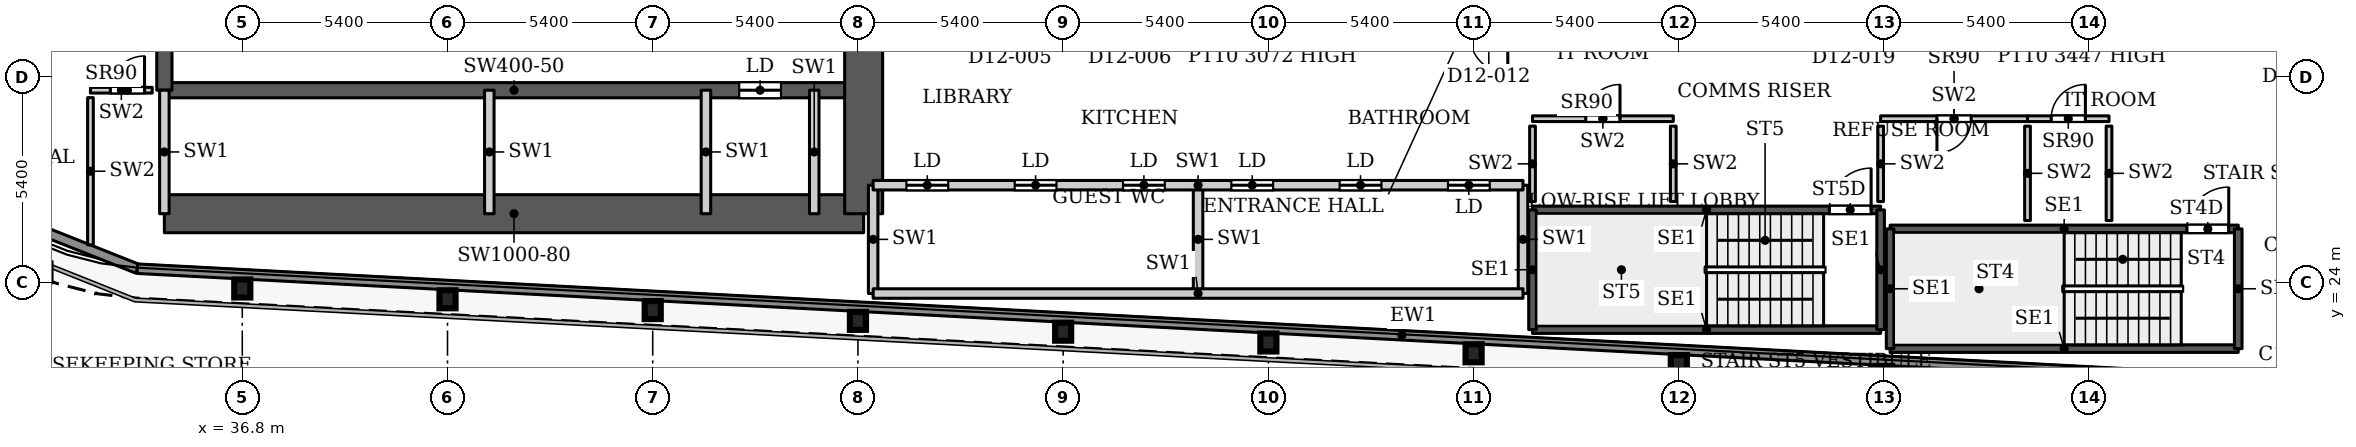
"""IFC4 building model, lengths in metres.
Left out: names, types, materials, properties, quantities, classifications, styles, units other than length and angle.
Written with IfcOpenShell. Run it as: python <this file> out.ifc"""

import sys

from ifc_helpers import new_model, si_unit, direction, frame, frame_2d, origin, origin_2d, place, context, subcontext, project, spatial, rectangle, i_section, extrude, source, transform, mapped, element, fill, save


model = new_model("IFC4")
c1 = context("Model", 3, precision=1e-05, world=origin(), true_north=direction((0.0, 1.0)))
c2 = subcontext(c1, "Body", "Model", "MODEL_VIEW")
j1 = project(units=[si_unit("LENGTHUNIT", "METRE"), si_unit("PLANEANGLEUNIT", "RADIAN")], contexts=[c1])
p1 = place(None, origin())
s1 = spatial("IfcSite", under=j1, at=p1, CompositionType="ELEMENT")
p2 = place(p1, origin())
s2 = spatial("IfcBuilding", under=s1, at=p2, CompositionType="ELEMENT")
p3 = place(p2, frame((0.0, 0.0, 53.9)))
s3 = spatial("IfcBuildingStorey", under=s2, at=p3, CompositionType="ELEMENT", Elevation=53.9)
for number, where, z_axis, x_axis in (
    (1, (80.0, 21.558, 0.0), (0.0, 0.0, 1.0), (1.0, 0.0, 0.0)),
    (2, (74.6, 21.843, 0.0), (0.0, 0.0, 1.0), (1.0, 0.0, 0.0)),
    (3, (69.2, 22.127, 0.0), (0.0, 0.0, 1.0), (1.0, 0.0, 0.0)),
    (4, (63.8, 22.411, 0.0), (0.0, 0.0, 1.0), (1.0, 0.0, 0.0)),
    (5, (58.4, 22.695, 0.0), (0.0, 0.0, 1.0), (1.0, 0.0, 0.0)),
    (6, (53.0, 22.98, 0.0), (0.0, 0.0, 1.0), (1.0, 0.0, 0.0)),
    (7, (47.6, 23.264, 0.0), (0.0, 0.0, 1.0), (1.0, 0.0, 0.0)),
    (8, (42.2, 23.548, 0.0), (0.0, 0.0, 1.0), (1.0, 0.0, 0.0)),
    (9, (36.8, 23.832, 0.0), (0.0, 0.0, 1.0), (1.0, 0.0, 0.0)),
):
    element("IfcColumn", number, at=place(p3, frame(where, z_axis=z_axis, x_axis=x_axis)), inside=s3, PredefinedType="COLUMN", context=c2, shape_type="SweptSolid", body=[
        extrude(i_section(OverallWidth=0.424, OverallDepth=0.474, WebThickness=0.048, FlangeThickness=0.077, FilletRadius=0.014, at=origin_2d()), origin(), (0.0, 0.0, 1.0), 3.9),
    ])
p4 = place(p3, frame((34.75, 25.8, 0.0), z_axis=(0.0, 0.0, 1.0), x_axis=(1.0, 0.0, 0.0)))
e10 = element("IfcWall", 10, at=p4, inside=s3, PredefinedType="SHEAR", context=c2, shape_type="SweptSolid", body=[
    extrude(rectangle(XDim=18.4, YDim=1.0, at=frame_2d((9.2, 0.0))), origin(), (0.0, 0.0, 1.0), 3.9),
])
p5 = place(p3, frame((34.75, 29.05, 0.0), z_axis=(0.0, 0.0, 1.0), x_axis=(1.0, 0.0, 0.0)))
e11 = element("IfcWall", 11, at=p5, inside=s3, PredefinedType="SHEAR", context=c2, shape_type="SweptSolid", body=[
    extrude(rectangle(XDim=18.4, YDim=0.4, at=frame_2d((9.2, 0.0))), origin(), (0.0, 0.0, 1.0), 3.9),
])
p6 = place(p5, frame((15.125, 0.0, 0.0)))
e12 = element("IfcOpeningElement", 12, at=p6, cuts=e11, PredefinedType="OPENING", context=c2, shape_type="SweptSolid", body=[
    extrude(rectangle(XDim=1.1, YDim=2.2, at=frame_2d((0.55, 1.1))), frame((0.0, 0.21, 0.0), z_axis=(0.0, -1.0, 0.0), x_axis=(1.0, 0.0, 0.0)), (0.0, 0.0, 1.0), 0.42),
])
p7 = place(p3, frame((34.75, 29.05, 0.0), z_axis=(0.0, 0.0, 1.0), x_axis=(0.0, 1.0, 0.0)))
e13 = element("IfcWall", 13, at=p7, inside=s3, PredefinedType="SHEAR", context=c2, shape_type="SweptSolid", body=[
    extrude(rectangle(XDim=18.45, YDim=0.4, at=frame_2d((9.225, 0.0))), origin(), (0.0, 0.0, 1.0), 3.9),
])
p8 = place(p7, frame((8.025, 0.0, 0.0)))
e14 = element("IfcOpeningElement", 14, at=p8, cuts=e13, PredefinedType="OPENING", context=c2, shape_type="SweptSolid", body=[
    extrude(rectangle(XDim=1.1, YDim=2.2, at=frame_2d((0.55, 1.1))), frame((0.0, 0.21, 0.0), z_axis=(0.0, -1.0, 0.0), x_axis=(1.0, 0.0, 0.0)), (0.0, 0.0, 1.0), 0.42),
])
p9 = place(p7, frame((10.875, 0.0, 0.0)))
e15 = element("IfcOpeningElement", 15, at=p9, cuts=e13, PredefinedType="OPENING", context=c2, shape_type="SweptSolid", body=[
    extrude(rectangle(XDim=1.1, YDim=2.2, at=frame_2d((0.55, 1.1))), frame((0.0, 0.21, 0.0), z_axis=(0.0, -1.0, 0.0), x_axis=(1.0, 0.0, 0.0)), (0.0, 0.0, 1.0), 0.42),
])
p10 = place(p7, frame((13.725, 0.0, 0.0)))
e16 = element("IfcOpeningElement", 16, at=p10, cuts=e13, PredefinedType="OPENING", context=c2, shape_type="SweptSolid", body=[
    extrude(rectangle(XDim=1.1, YDim=2.2, at=frame_2d((0.55, 1.1))), frame((0.0, 0.21, 0.0), z_axis=(0.0, -1.0, 0.0), x_axis=(1.0, 0.0, 0.0)), (0.0, 0.0, 1.0), 0.42),
])
p11 = place(p7, frame((15.95, 0.0, 0.0)))
e17 = element("IfcOpeningElement", 17, at=p11, cuts=e13, PredefinedType="OPENING", context=c2, shape_type="SweptSolid", body=[
    extrude(rectangle(XDim=1.1, YDim=2.2, at=frame_2d((0.55, 1.1))), frame((0.0, 0.21, 0.0), z_axis=(0.0, -1.0, 0.0), x_axis=(1.0, 0.0, 0.0)), (0.0, 0.0, 1.0), 0.42),
])
p12 = place(p3, frame((53.15, 25.8, 0.0), z_axis=(0.0, 0.0, 1.0), x_axis=(0.0, 1.0, 0.0)))
e18 = element("IfcWall", 18, at=p12, inside=s3, PredefinedType="SHEAR", context=c2, shape_type="SweptSolid", body=[
    extrude(rectangle(XDim=10.4, YDim=1.0, at=frame_2d((5.2, 0.0))), origin(), (0.0, 0.0, 1.0), 3.9),
])
p13 = place(p3, frame((34.039, 24.353, 0.0), z_axis=(0.0, 0.0, 1.0), x_axis=(-0.929352825399, 0.369192803184, 0.0)))
e19 = element("IfcWall", 19, at=p13, inside=s3, PredefinedType="SOLIDWALL", context=c2, shape_type="SweptSolid", body=[
    extrude(rectangle(XDim=4.656, YDim=0.25, at=frame_2d((2.328, 0.0))), origin(), (0.0, 0.0, 1.0), 3.75),
])
p14 = place(p3, frame((100.586, 20.85, 0.0), z_axis=(0.0, 0.0, 1.0), x_axis=(-0.99861746497, 0.052565755559, 0.0)))
e20 = element("IfcWall", 20, at=p14, inside=s3, PredefinedType="SOLIDWALL", context=c2, shape_type="SweptSolid", body=[
    extrude(rectangle(XDim=66.639, YDim=0.25, at=frame_2d((33.319, 0.0))), origin(), (0.0, 0.0, 1.0), 3.75),
])
p15 = place(p3, frame((80.16, 22.25, 0.0), z_axis=(0.0, 0.0, 1.0), x_axis=(1.0, 0.0, 0.0)))
e21 = element("IfcWall", 21, at=p15, inside=s3, PredefinedType="SHEAR", context=c2, shape_type="SweptSolid", body=[
    extrude(rectangle(XDim=9.16, YDim=0.2, at=frame_2d((4.58, 0.0))), origin(), (0.0, 0.0, 1.0), 3.9),
])
p16 = place(p3, frame((80.16, 25.4, 0.0), z_axis=(0.0, 0.0, 1.0), x_axis=(1.0, 0.0, 0.0)))
e22 = element("IfcWall", 22, at=p16, inside=s3, PredefinedType="SHEAR", context=c2, shape_type="SweptSolid", body=[
    extrude(rectangle(XDim=9.16, YDim=0.2, at=frame_2d((4.58, 0.0))), origin(), (0.0, 0.0, 1.0), 3.9),
])
p17 = place(p16, frame((7.81, 0.0, 0.0)))
e23 = element("IfcOpeningElement", 23, at=p17, cuts=e22, PredefinedType="OPENING", context=c2, shape_type="SweptSolid", body=[
    extrude(rectangle(XDim=1.1, YDim=2.2, at=frame_2d((0.55, 1.1))), frame((0.0, 0.11, 0.0), z_axis=(0.0, -1.0, 0.0), x_axis=(1.0, 0.0, 0.0)), (0.0, 0.0, 1.0), 0.22),
])
for number, where, z_axis, x_axis in (
    (24, (80.16, 22.25, 0.0), (0.0, 0.0, 1.0), (0.0, 1.0, 0.0)),
    (25, (89.32, 22.25, 0.0), (0.0, 0.0, 1.0), (0.0, 1.0, 0.0)),
):
    element("IfcWall", number, at=place(p3, frame(where, z_axis=z_axis, x_axis=x_axis)), inside=s3, PredefinedType="SHEAR", context=c2, shape_type="SweptSolid", body=[
        extrude(rectangle(XDim=3.15, YDim=0.2, at=frame_2d((1.575, 0.0))), origin(), (0.0, 0.0, 1.0), 3.9),
    ])
p18 = place(p3, frame((70.75, 22.75, 0.0), z_axis=(0.0, 0.0, 1.0), x_axis=(1.0, 0.0, 0.0)))
e26 = element("IfcWall", 26, at=p18, inside=s3, PredefinedType="SHEAR", context=c2, shape_type="SweptSolid", body=[
    extrude(rectangle(XDim=9.16, YDim=0.2, at=frame_2d((4.58, 0.0))), origin(), (0.0, 0.0, 1.0), 3.9),
])
p19 = place(p3, frame((70.75, 25.9, 0.0), z_axis=(0.0, 0.0, 1.0), x_axis=(1.0, 0.0, 0.0)))
e27 = element("IfcWall", 27, at=p19, inside=s3, PredefinedType="SHEAR", context=c2, shape_type="SweptSolid", body=[
    extrude(rectangle(XDim=9.16, YDim=0.2, at=frame_2d((4.58, 0.0))), origin(), (0.0, 0.0, 1.0), 3.9),
])
p20 = place(p19, frame((7.81, 0.0, 0.0)))
e28 = element("IfcOpeningElement", 28, at=p20, cuts=e27, PredefinedType="OPENING", context=c2, shape_type="SweptSolid", body=[
    extrude(rectangle(XDim=1.1, YDim=2.2, at=frame_2d((0.55, 1.1))), frame((0.0, 0.11, 0.0), z_axis=(0.0, -1.0, 0.0), x_axis=(1.0, 0.0, 0.0)), (0.0, 0.0, 1.0), 0.22),
])
for number, where, z_axis, x_axis in (
    (29, (70.75, 22.75, 0.0), (0.0, 0.0, 1.0), (0.0, 1.0, 0.0)),
    (30, (79.91, 22.75, 0.0), (0.0, 0.0, 1.0), (0.0, 1.0, 0.0)),
):
    element("IfcWall", number, at=place(p3, frame(where, z_axis=z_axis, x_axis=x_axis)), inside=s3, PredefinedType="SHEAR", context=c2, shape_type="SweptSolid", body=[
        extrude(rectangle(XDim=3.15, YDim=0.2, at=frame_2d((1.575, 0.0))), origin(), (0.0, 0.0, 1.0), 3.9),
    ])
for number, where, z_axis, x_axis in (
    (31, (34.75, 25.8, 0.0), (0.0, 0.0, 1.0), (0.0, 1.0, 0.0)),
    (32, (43.3, 25.8, 0.0), (0.0, 0.0, 1.0), (0.0, 1.0, 0.0)),
    (33, (49.0, 25.8, 0.0), (0.0, 0.0, 1.0), (0.0, 1.0, 0.0)),
    (34, (51.85, 25.8, 0.0), (0.0, 0.0, 1.0), (0.0, 1.0, 0.0)),
):
    element("IfcWall", number, at=place(p3, frame(where, z_axis=z_axis, x_axis=x_axis)), inside=s3, PredefinedType="PARTITIONING", context=c2, shape_type="SweptSolid", body=[
        extrude(rectangle(XDim=3.25, YDim=0.25, at=frame_2d((1.625, 0.0))), origin(), (0.0, 0.0, 1.0), 3.9),
    ])
for number, where, z_axis, x_axis in (
    (35, (53.4, 23.7, 0.0), (0.0, 0.0, 1.0), (0.0, 1.0, 0.0)),
    (36, (61.95, 23.7, 0.0), (0.0, 0.0, 1.0), (0.0, 1.0, 0.0)),
    (37, (70.5, 23.7, 0.0), (0.0, 0.0, 1.0), (0.0, 1.0, 0.0)),
):
    element("IfcWall", number, at=place(p3, frame(where, z_axis=z_axis, x_axis=x_axis)), inside=s3, PredefinedType="PARTITIONING", context=c2, shape_type="SweptSolid", body=[
        extrude(rectangle(XDim=2.85, YDim=0.25, at=frame_2d((1.425, 0.0))), origin(), (0.0, 0.0, 1.0), 3.9),
    ])
p21 = place(p3, frame((53.4, 23.7, 0.0), z_axis=(0.0, 0.0, 1.0), x_axis=(1.0, 0.0, 0.0)))
e38 = element("IfcWall", 38, at=p21, inside=s3, PredefinedType="PARTITIONING", context=c2, shape_type="SweptSolid", body=[
    extrude(rectangle(XDim=17.1, YDim=0.25, at=frame_2d((8.55, 0.0))), origin(), (0.0, 0.0, 1.0), 3.9),
])
p22 = place(p3, frame((53.4, 26.55, 0.0), z_axis=(0.0, 0.0, 1.0), x_axis=(1.0, 0.0, 0.0)))
e39 = element("IfcWall", 39, at=p22, inside=s3, PredefinedType="PARTITIONING", context=c2, shape_type="SweptSolid", body=[
    extrude(rectangle(XDim=17.1, YDim=0.25, at=frame_2d((8.55, 0.0))), origin(), (0.0, 0.0, 1.0), 3.9),
])
p23 = place(p22, frame((0.875, 0.0, 0.0)))
e40 = element("IfcOpeningElement", 40, at=p23, cuts=e39, PredefinedType="OPENING", context=c2, shape_type="SweptSolid", body=[
    extrude(rectangle(XDim=1.1, YDim=2.2, at=frame_2d((0.55, 1.1))), frame((0.0, 0.135, 0.0), z_axis=(0.0, -1.0, 0.0), x_axis=(1.0, 0.0, 0.0)), (0.0, 0.0, 1.0), 0.27),
])
p24 = place(p22, frame((3.725, 0.0, 0.0)))
e41 = element("IfcOpeningElement", 41, at=p24, cuts=e39, PredefinedType="OPENING", context=c2, shape_type="SweptSolid", body=[
    extrude(rectangle(XDim=1.1, YDim=2.2, at=frame_2d((0.55, 1.1))), frame((0.0, 0.135, 0.0), z_axis=(0.0, -1.0, 0.0), x_axis=(1.0, 0.0, 0.0)), (0.0, 0.0, 1.0), 0.27),
])
p25 = place(p22, frame((6.575, 0.0, 0.0)))
e42 = element("IfcOpeningElement", 42, at=p25, cuts=e39, PredefinedType="OPENING", context=c2, shape_type="SweptSolid", body=[
    extrude(rectangle(XDim=1.1, YDim=2.2, at=frame_2d((0.55, 1.1))), frame((0.0, 0.135, 0.0), z_axis=(0.0, -1.0, 0.0), x_axis=(1.0, 0.0, 0.0)), (0.0, 0.0, 1.0), 0.27),
])
p26 = place(p22, frame((9.425, 0.0, 0.0)))
e43 = element("IfcOpeningElement", 43, at=p26, cuts=e39, PredefinedType="OPENING", context=c2, shape_type="SweptSolid", body=[
    extrude(rectangle(XDim=1.1, YDim=2.2, at=frame_2d((0.55, 1.1))), frame((0.0, 0.135, 0.0), z_axis=(0.0, -1.0, 0.0), x_axis=(1.0, 0.0, 0.0)), (0.0, 0.0, 1.0), 0.27),
])
p27 = place(p22, frame((12.275, 0.0, 0.0)))
e44 = element("IfcOpeningElement", 44, at=p27, cuts=e39, PredefinedType="OPENING", context=c2, shape_type="SweptSolid", body=[
    extrude(rectangle(XDim=1.1, YDim=2.2, at=frame_2d((0.55, 1.1))), frame((0.0, 0.135, 0.0), z_axis=(0.0, -1.0, 0.0), x_axis=(1.0, 0.0, 0.0)), (0.0, 0.0, 1.0), 0.27),
])
p28 = place(p22, frame((15.125, 0.0, 0.0)))
e45 = element("IfcOpeningElement", 45, at=p28, cuts=e39, PredefinedType="OPENING", context=c2, shape_type="SweptSolid", body=[
    extrude(rectangle(XDim=1.1, YDim=2.2, at=frame_2d((0.55, 1.1))), frame((0.0, 0.135, 0.0), z_axis=(0.0, -1.0, 0.0), x_axis=(1.0, 0.0, 0.0)), (0.0, 0.0, 1.0), 0.27),
])
p29 = place(p3, frame((32.805, 29.05, 0.0), z_axis=(0.0, 0.0, 1.0), x_axis=(1.0, 0.0, 0.0)))
e46 = element("IfcWall", 46, at=p29, inside=s3, PredefinedType="PARTITIONING", context=c2, shape_type="SweptSolid", body=[
    extrude(rectangle(XDim=1.625, YDim=0.15, at=frame_2d((0.812, 0.0))), origin(), (0.0, 0.0, 1.0), 3.9),
])
p30 = place(p29, frame((0.523, 0.0, 0.0)))
e47 = element("IfcOpeningElement", 47, at=p30, cuts=e46, PredefinedType="OPENING", context=c2, shape_type="SweptSolid", body=[
    extrude(rectangle(XDim=0.9, YDim=2.2, at=frame_2d((0.45, 1.1))), frame((0.0, 0.085, 0.0), z_axis=(0.0, -1.0, 0.0), x_axis=(1.0, 0.0, 0.0)), (0.0, 0.0, 1.0), 0.17),
])
p31 = place(p3, frame((32.805, 24.98, 0.0), z_axis=(0.0, 0.0, 1.0), x_axis=(0.0, 1.0, 0.0)))
e48 = element("IfcWall", 48, at=p31, inside=s3, PredefinedType="PARTITIONING", context=c2, shape_type="SweptSolid", body=[
    extrude(rectangle(XDim=3.875, YDim=0.15, at=frame_2d((1.938, 0.0))), origin(), (0.0, 0.0, 1.0), 3.9),
])
p32 = place(p3, frame((70.75, 28.3, 0.0), z_axis=(0.0, 0.0, 1.0), x_axis=(1.0, 0.0, 0.0)))
e49 = element("IfcWall", 49, at=p32, inside=s3, PredefinedType="PARTITIONING", context=c2, shape_type="SweptSolid", body=[
    extrude(rectangle(XDim=3.704, YDim=0.15, at=frame_2d((1.852, 0.0))), origin(), (0.0, 0.0, 1.0), 3.9),
])
p33 = place(p32, frame((1.402, 0.0, 0.0)))
e50 = element("IfcOpeningElement", 50, at=p33, cuts=e49, PredefinedType="OPENING", context=c2, shape_type="SweptSolid", body=[
    extrude(rectangle(XDim=0.9, YDim=2.2, at=frame_2d((0.45, 1.1))), frame((0.0, 0.085, 0.0), z_axis=(0.0, -1.0, 0.0), x_axis=(1.0, 0.0, 0.0)), (0.0, 0.0, 1.0), 0.17),
])
for number, where, z_axis, x_axis in (
    (51, (70.75, 26.12, 0.0), (0.0, 0.0, 1.0), (0.0, 1.0, 0.0)),
    (52, (74.454, 26.12, 0.0), (0.0, 0.0, 1.0), (0.0, 1.0, 0.0)),
):
    element("IfcWall", number, at=place(p3, frame(where, z_axis=z_axis, x_axis=x_axis)), inside=s3, PredefinedType="PARTITIONING", context=c2, shape_type="SweptSolid", body=[
        extrude(rectangle(XDim=1.985, YDim=0.15, at=frame_2d((0.992, 0.0))), origin(), (0.0, 0.0, 1.0), 3.9),
    ])
p34 = place(p3, frame((79.91, 28.3, 0.0), z_axis=(0.0, 0.0, 1.0), x_axis=(1.0, 0.0, 0.0)))
e53 = element("IfcWall", 53, at=p34, inside=s3, PredefinedType="PARTITIONING", context=c2, shape_type="SweptSolid", body=[
    extrude(rectangle(XDim=3.865, YDim=0.15, at=frame_2d((1.933, 0.0))), origin(), (0.0, 0.0, 1.0), 3.9),
])
p35 = place(p34, frame((1.482, 0.0, 0.0)))
e54 = element("IfcOpeningElement", 54, at=p35, cuts=e53, PredefinedType="OPENING", context=c2, shape_type="SweptSolid", body=[
    extrude(rectangle(XDim=0.9, YDim=2.2, at=frame_2d((0.45, 1.1))), frame((0.0, 0.085, 0.0), z_axis=(0.0, -1.0, 0.0), x_axis=(1.0, 0.0, 0.0)), (0.0, 0.0, 1.0), 0.17),
])
p36 = place(p3, frame((79.91, 26.12, 0.0), z_axis=(0.0, 0.0, 1.0), x_axis=(0.0, 1.0, 0.0)))
e55 = element("IfcWall", 55, at=p36, inside=s3, PredefinedType="PARTITIONING", context=c2, shape_type="SweptSolid", body=[
    extrude(rectangle(XDim=1.985, YDim=0.15, at=frame_2d((0.992, 0.0))), origin(), (0.0, 0.0, 1.0), 3.9),
])
p37 = place(p3, frame((83.775, 25.62, 0.0), z_axis=(0.0, 0.0, 1.0), x_axis=(0.0, 1.0, 0.0)))
e56 = element("IfcWall", 56, at=p37, inside=s3, PredefinedType="PARTITIONING", context=c2, shape_type="SweptSolid", body=[
    extrude(rectangle(XDim=2.485, YDim=0.15, at=frame_2d((1.242, 0.0))), origin(), (0.0, 0.0, 1.0), 3.9),
])
p38 = place(p3, frame((83.775, 28.3, 0.0), z_axis=(0.0, 0.0, 1.0), x_axis=(1.0, 0.0, 0.0)))
e57 = element("IfcWall", 57, at=p38, inside=s3, PredefinedType="PARTITIONING", context=c2, shape_type="SweptSolid", body=[
    extrude(rectangle(XDim=2.145, YDim=0.15, at=frame_2d((1.073, 0.0))), origin(), (0.0, 0.0, 1.0), 3.9),
])
p39 = place(p38, frame((0.623, 0.0, 0.0)))
e58 = element("IfcOpeningElement", 58, at=p39, cuts=e57, PredefinedType="OPENING", context=c2, shape_type="SweptSolid", body=[
    extrude(rectangle(XDim=0.9, YDim=2.2, at=frame_2d((0.45, 1.1))), frame((0.0, 0.085, 0.0), z_axis=(0.0, -1.0, 0.0), x_axis=(1.0, 0.0, 0.0)), (0.0, 0.0, 1.0), 0.17),
])
p40 = place(p3, frame((85.92, 25.62, 0.0), z_axis=(0.0, 0.0, 1.0), x_axis=(0.0, 1.0, 0.0)))
e59 = element("IfcWall", 59, at=p40, inside=s3, PredefinedType="PARTITIONING", context=c2, shape_type="SweptSolid", body=[
    extrude(rectangle(XDim=2.485, YDim=0.15, at=frame_2d((1.242, 0.0))), origin(), (0.0, 0.0, 1.0), 3.9),
])
m1 = source(origin(), c2, "Body", "SweptSolid", [
    extrude(rectangle(XDim=1.1, YDim=2.2, at=frame_2d((0.55, 1.1))), frame((0.0, 0.025, 0.0), z_axis=(0.0, -1.0, 0.0), x_axis=(1.0, 0.0, 0.0)), (0.0, 0.0, 1.0), 0.05),
])
p41 = place(p23, origin())
e60 = element("IfcDoor", 60, at=p41, inside=s3, OperationType="SLIDING_TO_LEFT", PredefinedType="DOOR", context=c2, shape_type="MappedRepresentation", body=[
    mapped(m1, transform((0.0, 0.0, 0.0), x_axis=(1.0, 0.0, 0.0), y_axis=(0.0, 1.0, 0.0), z_axis=(0.0, 0.0, 1.0), scale=1.0)),
])
fill(e40, e60)
p42 = place(p24, origin())
e61 = element("IfcDoor", 61, at=p42, inside=s3, OperationType="SLIDING_TO_LEFT", PredefinedType="DOOR", context=c2, shape_type="MappedRepresentation", body=[
    mapped(m1, transform((0.0, 0.0, 0.0), x_axis=(1.0, 0.0, 0.0), y_axis=(0.0, 1.0, 0.0), z_axis=(0.0, 0.0, 1.0), scale=1.0)),
])
fill(e41, e61)
p43 = place(p25, origin())
e62 = element("IfcDoor", 62, at=p43, inside=s3, OperationType="SLIDING_TO_LEFT", PredefinedType="DOOR", context=c2, shape_type="MappedRepresentation", body=[
    mapped(m1, transform((0.0, 0.0, 0.0), x_axis=(1.0, 0.0, 0.0), y_axis=(0.0, 1.0, 0.0), z_axis=(0.0, 0.0, 1.0), scale=1.0)),
])
fill(e42, e62)
p44 = place(p26, origin())
e63 = element("IfcDoor", 63, at=p44, inside=s3, OperationType="SLIDING_TO_LEFT", PredefinedType="DOOR", context=c2, shape_type="MappedRepresentation", body=[
    mapped(m1, transform((0.0, 0.0, 0.0), x_axis=(1.0, 0.0, 0.0), y_axis=(0.0, 1.0, 0.0), z_axis=(0.0, 0.0, 1.0), scale=1.0)),
])
fill(e43, e63)
p45 = place(p27, origin())
e64 = element("IfcDoor", 64, at=p45, inside=s3, OperationType="SLIDING_TO_LEFT", PredefinedType="DOOR", context=c2, shape_type="MappedRepresentation", body=[
    mapped(m1, transform((0.0, 0.0, 0.0), x_axis=(1.0, 0.0, 0.0), y_axis=(0.0, 1.0, 0.0), z_axis=(0.0, 0.0, 1.0), scale=1.0)),
])
fill(e44, e64)
p46 = place(p28, origin())
e65 = element("IfcDoor", 65, at=p46, inside=s3, OperationType="SLIDING_TO_LEFT", PredefinedType="DOOR", context=c2, shape_type="MappedRepresentation", body=[
    mapped(m1, transform((0.0, 0.0, 0.0), x_axis=(1.0, 0.0, 0.0), y_axis=(0.0, 1.0, 0.0), z_axis=(0.0, 0.0, 1.0), scale=1.0)),
])
fill(e45, e65)
p47 = place(p6, origin())
e66 = element("IfcDoor", 66, at=p47, inside=s3, OperationType="SLIDING_TO_LEFT", PredefinedType="DOOR", context=c2, shape_type="MappedRepresentation", body=[
    mapped(m1, transform((0.0, 0.0, 0.0), x_axis=(1.0, 0.0, 0.0), y_axis=(0.0, 1.0, 0.0), z_axis=(0.0, 0.0, 1.0), scale=1.0)),
])
fill(e12, e66)
m2 = source(origin(), c2, "Body", "SweptSolid", [
    extrude(rectangle(XDim=0.9, YDim=2.2, at=frame_2d((0.45, 1.1))), frame((0.0, 0.025, 0.0), z_axis=(0.0, -1.0, 0.0), x_axis=(1.0, 0.0, 0.0)), (0.0, 0.0, 1.0), 0.05),
])
p48 = place(p30, origin())
e67 = element("IfcDoor", 67, at=p48, inside=s3, OperationType="SINGLE_SWING_LEFT", PredefinedType="DOOR", context=c2, shape_type="MappedRepresentation", body=[
    mapped(m2, transform((0.0, 0.0, 0.0), x_axis=(1.0, 0.0, 0.0), y_axis=(0.0, 1.0, 0.0), z_axis=(0.0, 0.0, 1.0), scale=1.0)),
])
fill(e47, e67)
p49 = place(p33, origin())
e68 = element("IfcDoor", 68, at=p49, inside=s3, OperationType="SINGLE_SWING_LEFT", PredefinedType="DOOR", context=c2, shape_type="MappedRepresentation", body=[
    mapped(m2, transform((0.0, 0.0, 0.0), x_axis=(1.0, 0.0, 0.0), y_axis=(0.0, 1.0, 0.0), z_axis=(0.0, 0.0, 1.0), scale=1.0)),
])
fill(e50, e68)
p50 = place(p35, origin())
e69 = element("IfcDoor", 69, at=p50, inside=s3, OperationType="SINGLE_SWING_RIGHT", PredefinedType="DOOR", context=c2, shape_type="MappedRepresentation", body=[
    mapped(m2, transform((0.0, 0.0, 0.0), x_axis=(1.0, 0.0, 0.0), y_axis=(0.0, 1.0, 0.0), z_axis=(0.0, 0.0, 1.0), scale=1.0)),
])
fill(e54, e69)
p51 = place(p39, origin())
e70 = element("IfcDoor", 70, at=p51, inside=s3, OperationType="SINGLE_SWING_LEFT", PredefinedType="DOOR", context=c2, shape_type="MappedRepresentation", body=[
    mapped(m2, transform((0.0, 0.0, 0.0), x_axis=(1.0, 0.0, 0.0), y_axis=(0.0, 1.0, 0.0), z_axis=(0.0, 0.0, 1.0), scale=1.0)),
])
fill(e58, e70)
m3 = source(origin(), c2, "Body", "SweptSolid", [
    extrude(rectangle(XDim=1.1, YDim=2.2, at=frame_2d((0.55, 1.1))), frame((0.0, 0.025, 0.0), z_axis=(0.0, -1.0, 0.0), x_axis=(1.0, 0.0, 0.0)), (0.0, 0.0, 1.0), 0.05),
])
p52 = place(p17, origin())
e71 = element("IfcDoor", 71, at=p52, inside=s3, OperationType="SINGLE_SWING_LEFT", PredefinedType="DOOR", context=c2, shape_type="MappedRepresentation", body=[
    mapped(m3, transform((0.0, 0.0, 0.0), x_axis=(1.0, 0.0, 0.0), y_axis=(0.0, 1.0, 0.0), z_axis=(0.0, 0.0, 1.0), scale=1.0)),
])
fill(e23, e71)
p53 = place(p20, origin())
e72 = element("IfcDoor", 72, at=p53, inside=s3, OperationType="SINGLE_SWING_LEFT", PredefinedType="DOOR", context=c2, shape_type="MappedRepresentation", body=[
    mapped(m3, transform((0.0, 0.0, 0.0), x_axis=(1.0, 0.0, 0.0), y_axis=(0.0, 1.0, 0.0), z_axis=(0.0, 0.0, 1.0), scale=1.0)),
])
fill(e28, e72)
save(model, sys.argv[1])
